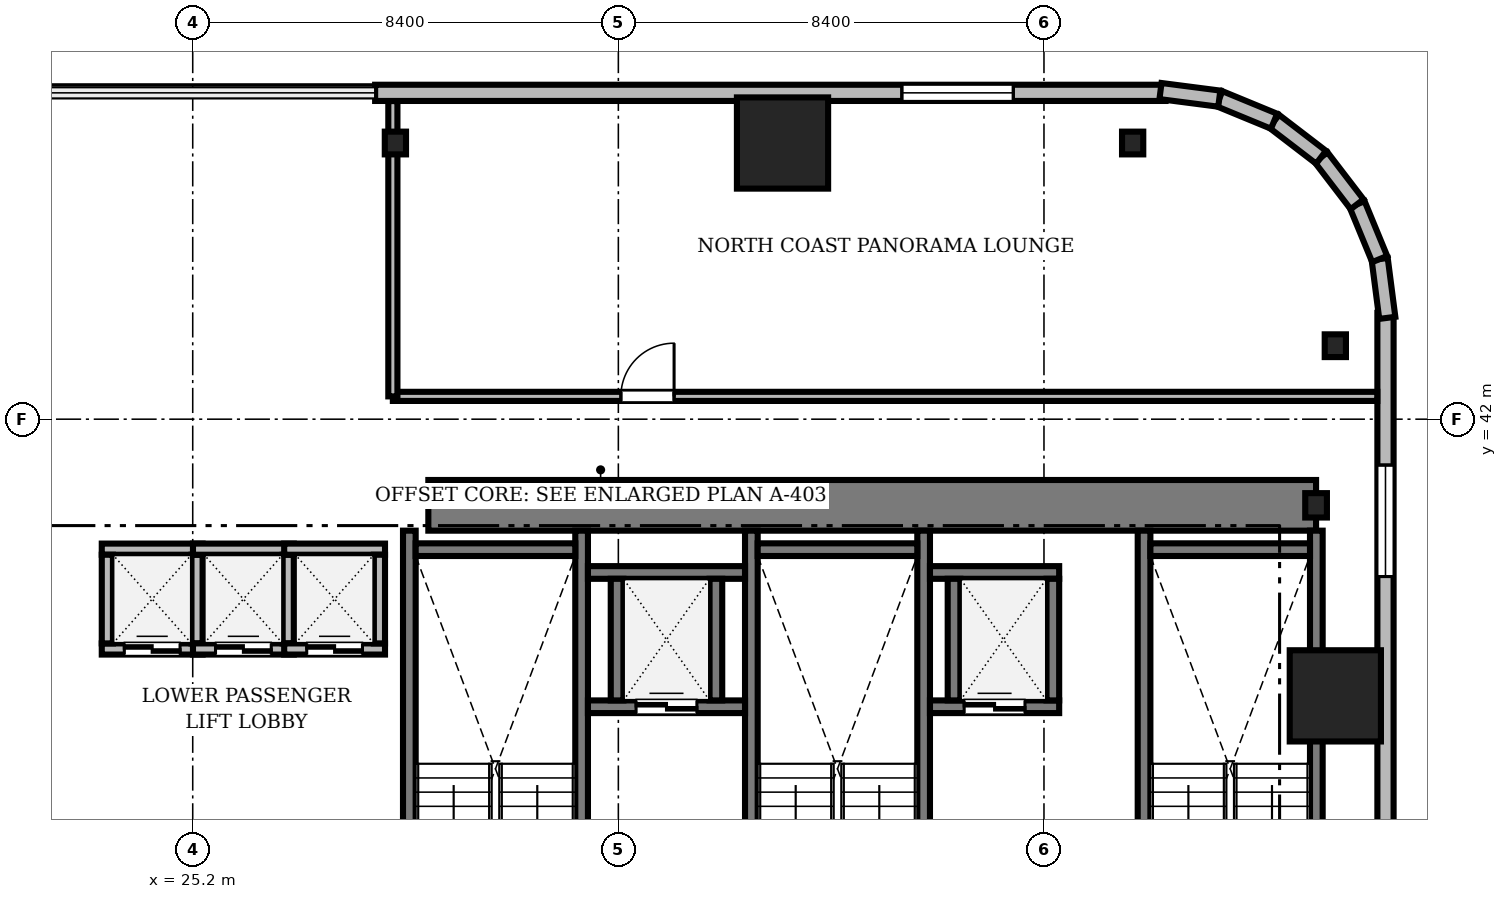
"""IFC4 building model, lengths in metres.
Left out: names, types, materials, properties, quantities, classifications, styles, units other than length and angle.
Written with IfcOpenShell. Run it as: python <this file> out.ifc"""

import sys

from ifc_helpers import new_model, si_unit, direction, frame, frame_2d, origin, origin_2d, place, context, subcontext, project, spatial, rectangle, i_section, extrude, source, transform, mapped, element, fill, save


model = new_model("IFC4")
c1 = context("Model", 3, precision=1e-05, world=origin(), true_north=direction((0.0, 1.0)))
c2 = subcontext(c1, "Body", "Model", "MODEL_VIEW")
j1 = project(units=[si_unit("LENGTHUNIT", "METRE"), si_unit("PLANEANGLEUNIT", "RADIAN")], contexts=[c1])
p1 = place(None, origin())
s1 = spatial("IfcSite", under=j1, at=p1, CompositionType="ELEMENT")
p2 = place(p1, origin())
s2 = spatial("IfcBuilding", under=s1, at=p2, CompositionType="ELEMENT")
p3 = place(p2, frame((0.0, 0.0, 45.85)))
s3 = spatial("IfcBuildingStorey", under=s2, at=p3, CompositionType="ELEMENT", Elevation=45.85)
m1 = source(origin(), c2, "Body", "SweptSolid", [
    extrude(rectangle(XDim=17.52, YDim=1.0, at=frame_2d((8.76, 0.0))), origin(), (0.0, 0.0, 1.0), 3.41),
])
p4 = place(p3, frame((29.85, 40.3, 0.0), z_axis=(0.0, 0.0, 1.0), x_axis=(1.0, 0.0, 0.0)))
e1 = element("IfcWall", 1, at=p4, inside=s3, PredefinedType="SHEAR", context=c2, shape_type="MappedRepresentation", body=[
    mapped(m1, transform((0.0, 0.0, 0.0), scale=1.0)),
])
m2 = source(origin(), c2, "Body", "SweptSolid", [
    extrude(i_section(OverallWidth=0.428, OverallDepth=0.481, WebThickness=0.04, FlangeThickness=0.063, FilletRadius=0.015, at=origin_2d()), origin(), (0.0, 0.0, 1.0), 3.41),
])
p5 = place(p3, frame((47.37, 40.3, 0.0), z_axis=(0.0, 0.0, 1.0), x_axis=(1.0, 0.0, 0.0)))
e2 = element("IfcColumn", 2, at=p5, inside=s3, PredefinedType="COLUMN", context=c2, shape_type="MappedRepresentation", body=[
    mapped(m2, transform((0.0, 0.0, 0.0), scale=1.0)),
])
m3 = source(origin(), c2, "Body", "SweptSolid", [
    extrude(rectangle(XDim=1.8, YDim=1.8, at=origin_2d()), origin(), (0.0, 0.0, 1.0), 3.41),
])
for number, where, z_axis, x_axis in (
    (3, (47.75, 36.54, 0.0), (0.0, 0.0, 1.0), (1.0, 0.0, 0.0)),
    (4, (36.84, 47.45, 0.0), (0.0, 0.0, 1.0), (1.0, 0.0, 0.0)),
):
    element("IfcColumn", number, at=place(p3, frame(where, z_axis=z_axis, x_axis=x_axis)), inside=s3, PredefinedType="COLUMN", context=c2, shape_type="MappedRepresentation", body=[
        mapped(m3, transform((0.0, 0.0, 0.0), scale=1.0)),
    ])
m4 = source(origin(), c2, "Body", "SweptSolid", [
    extrude(i_section(OverallWidth=0.419, OverallDepth=0.449, WebThickness=0.031, FlangeThickness=0.048, FilletRadius=0.015, at=origin_2d()), origin(), (0.0, 0.0, 1.0), 3.41),
])
for number, where, z_axis, x_axis in (
    (5, (47.75, 43.45, 0.0), (0.0, 0.0, 1.0), (1.0, 0.0, 0.0)),
    (6, (43.75, 47.45, 0.0), (0.0, 0.0, 1.0), (1.0, 0.0, 0.0)),
    (7, (29.2, 47.45, 0.0), (0.0, 0.0, 1.0), (1.0, 0.0, 0.0)),
):
    element("IfcColumn", number, at=place(p3, frame(where, z_axis=z_axis, x_axis=x_axis)), inside=s3, PredefinedType="COLUMN", context=c2, shape_type="MappedRepresentation", body=[
        mapped(m4, transform((0.0, 0.0, 0.0), scale=1.0)),
    ])
m5 = source(origin(), c2, "Body", "SweptSolid", [
    extrude(rectangle(XDim=15.6, YDim=0.32, at=frame_2d((7.8, 0.0))), origin(), (0.0, 0.0, 1.0), 3.41),
])
p6 = place(p3, frame((44.4, 48.44, 0.0), z_axis=(0.0, 0.0, 1.0), x_axis=(-1.0, 0.0, 0.0)))
e8 = element("IfcWall", 8, at=p6, inside=s3, PredefinedType="SOLIDWALL", context=c2, shape_type="MappedRepresentation", body=[
    mapped(m5, transform((0.0, 0.0, 0.0), scale=1.0)),
])
m6 = source(origin(), c2, "Body", "SweptSolid", [
    extrude(rectangle(XDim=2.2, YDim=2.4, at=frame_2d((1.1, 1.2))), frame((0.0, 0.17, 0.0), z_axis=(0.0, -1.0, 0.0), x_axis=(1.0, 0.0, 0.0)), (0.0, 0.0, 1.0), 0.34),
])
p7 = place(p6, frame((3.005, 0.0, 0.72)))
e9 = element("IfcOpeningElement", 9, at=p7, cuts=e8, PredefinedType="OPENING", context=c2, shape_type="MappedRepresentation", body=[
    mapped(m6, transform((0.0, 0.0, 0.0), scale=1.0)),
])
m7 = source(origin(), c2, "Body", "SweptSolid", [
    extrude(rectangle(XDim=15.6, YDim=0.32, at=frame_2d((7.8, 0.0))), origin(), (0.0, 0.0, 1.0), 3.41),
])
p8 = place(p3, frame((48.74, 28.5, 0.0), z_axis=(0.0, 0.0, 1.0), x_axis=(0.0, 1.0, 0.0)))
e10 = element("IfcWall", 10, at=p8, inside=s3, PredefinedType="SOLIDWALL", context=c2, shape_type="MappedRepresentation", body=[
    mapped(m7, transform((0.0, 0.0, 0.0), scale=1.0)),
])
p9 = place(p8, frame((10.395, 0.0, 0.72)))
e11 = element("IfcOpeningElement", 11, at=p9, cuts=e10, PredefinedType="OPENING", context=c2, shape_type="MappedRepresentation", body=[
    mapped(m6, transform((0.0, 0.0, 0.0), scale=1.0)),
])
m8 = source(origin(), c2, "Body", "SweptSolid", [
    extrude(rectangle(XDim=1.17, YDim=0.32, at=frame_2d((0.585, 0.0))), origin(), (0.0, 0.0, 1.0), 3.41),
])
p10 = place(p3, frame((48.776, 44.0, 0.0), z_axis=(0.0, 0.0, 1.0), x_axis=(-0.128295670475, 0.991735963317, 0.0)))
e12 = element("IfcWall", 12, at=p10, inside=s3, PredefinedType="SOLIDWALL", context=c2, shape_type="MappedRepresentation", body=[
    mapped(m8, transform((0.0, 0.0, 0.0), scale=1.0)),
])
m9 = source(origin(), c2, "Body", "SweptSolid", [
    extrude(rectangle(XDim=1.169, YDim=0.32, at=frame_2d((0.584, 0.0))), origin(), (0.0, 0.0, 1.0), 3.41),
])
p11 = place(p3, frame((48.625, 45.16, 0.0), z_axis=(0.0, 0.0, 1.0), x_axis=(-0.381054331552, 0.924552646638, 0.0)))
e13 = element("IfcWall", 13, at=p11, inside=s3, PredefinedType="SOLIDWALL", context=c2, shape_type="MappedRepresentation", body=[
    mapped(m9, transform((0.0, 0.0, 0.0), scale=1.0)),
])
m10 = source(origin(), c2, "Body", "SweptSolid", [
    extrude(rectangle(XDim=1.169, YDim=0.32, at=frame_2d((0.584, 0.0))), origin(), (0.0, 0.0, 1.0), 3.41),
])
p12 = place(p3, frame((48.18, 46.241, 0.0), z_axis=(0.0, 0.0, 1.0), x_axis=(-0.608387696831, 0.793639975269, 0.0)))
e14 = element("IfcWall", 14, at=p12, inside=s3, PredefinedType="SOLIDWALL", context=c2, shape_type="MappedRepresentation", body=[
    mapped(m10, transform((0.0, 0.0, 0.0), scale=1.0)),
])
m11 = source(origin(), c2, "Body", "SweptSolid", [
    extrude(rectangle(XDim=1.169, YDim=0.32, at=frame_2d((0.584, 0.0))), origin(), (0.0, 0.0, 1.0), 3.41),
])
p13 = place(p3, frame((47.469, 47.169, 0.0), z_axis=(0.0, 0.0, 1.0), x_axis=(-0.793663520347, 0.608356981114, 0.0)))
e15 = element("IfcWall", 15, at=p13, inside=s3, PredefinedType="SOLIDWALL", context=c2, shape_type="MappedRepresentation", body=[
    mapped(m11, transform((0.0, 0.0, 0.0), scale=1.0)),
])
p14 = place(p3, frame((46.541, 47.88, 0.0), z_axis=(0.0, 0.0, 1.0), x_axis=(-0.924552646638, 0.381054331552, 0.0)))
e16 = element("IfcWall", 16, at=p14, inside=s3, PredefinedType="SOLIDWALL", context=c2, shape_type="MappedRepresentation", body=[
    mapped(m9, transform((0.0, 0.0, 0.0), scale=1.0)),
])
p15 = place(p3, frame((45.46, 48.325, 0.0), z_axis=(0.0, 0.0, 1.0), x_axis=(-0.991735963317, 0.128295670475, 0.0)))
e17 = element("IfcWall", 17, at=p15, inside=s3, PredefinedType="SOLIDWALL", context=c2, shape_type="MappedRepresentation", body=[
    mapped(m8, transform((0.0, 0.0, 0.0), scale=1.0)),
])
m12 = source(origin(), c2, "Body", "SweptSolid", [
    extrude(rectangle(XDim=9.15, YDim=0.25, at=frame_2d((4.575, 0.0))), origin(), (0.0, 0.0, 1.0), 3.45),
])
for number, where, z_axis, x_axis in (
    (18, (29.475, 30.65, 0.0), (0.0, 0.0, 1.0), (0.0, 1.0, 0.0)),
    (19, (32.875, 30.65, 0.0), (0.0, 0.0, 1.0), (0.0, 1.0, 0.0)),
):
    element("IfcWall", number, at=place(p3, frame(where, z_axis=z_axis, x_axis=x_axis)), inside=s3, PredefinedType="SOLIDWALL", context=c2, shape_type="MappedRepresentation", body=[
        mapped(m12, transform((0.0, 0.0, 0.0), scale=1.0)),
    ])
m13 = source(origin(), c2, "Body", "SweptSolid", [
    extrude(rectangle(XDim=3.15, YDim=0.25, at=frame_2d((1.575, 0.0))), origin(), (0.0, 0.0, 1.0), 3.45),
])
p16 = place(p3, frame((29.6, 39.425, 0.0), z_axis=(0.0, 0.0, 1.0), x_axis=(1.0, 0.0, 0.0)))
e20 = element("IfcWall", 20, at=p16, inside=s3, PredefinedType="SOLIDWALL", context=c2, shape_type="MappedRepresentation", body=[
    mapped(m13, transform((0.0, 0.0, 0.0), scale=1.0)),
])
for number, where, z_axis, x_axis in (
    (21, (36.225, 30.65, 0.0), (0.0, 0.0, 1.0), (0.0, 1.0, 0.0)),
    (22, (39.625, 30.65, 0.0), (0.0, 0.0, 1.0), (0.0, 1.0, 0.0)),
):
    element("IfcWall", number, at=place(p3, frame(where, z_axis=z_axis, x_axis=x_axis)), inside=s3, PredefinedType="SOLIDWALL", context=c2, shape_type="MappedRepresentation", body=[
        mapped(m12, transform((0.0, 0.0, 0.0), scale=1.0)),
    ])
p17 = place(p3, frame((36.35, 39.425, 0.0), z_axis=(0.0, 0.0, 1.0), x_axis=(1.0, 0.0, 0.0)))
e23 = element("IfcWall", 23, at=p17, inside=s3, PredefinedType="SOLIDWALL", context=c2, shape_type="MappedRepresentation", body=[
    mapped(m13, transform((0.0, 0.0, 0.0), scale=1.0)),
])
for number, where, z_axis, x_axis in (
    (24, (43.975, 30.65, 0.0), (0.0, 0.0, 1.0), (0.0, 1.0, 0.0)),
    (25, (47.375, 30.65, 0.0), (0.0, 0.0, 1.0), (0.0, 1.0, 0.0)),
):
    element("IfcWall", number, at=place(p3, frame(where, z_axis=z_axis, x_axis=x_axis)), inside=s3, PredefinedType="SOLIDWALL", context=c2, shape_type="MappedRepresentation", body=[
        mapped(m12, transform((0.0, 0.0, 0.0), scale=1.0)),
    ])
p18 = place(p3, frame((44.1, 39.425, 0.0), z_axis=(0.0, 0.0, 1.0), x_axis=(1.0, 0.0, 0.0)))
e26 = element("IfcWall", 26, at=p18, inside=s3, PredefinedType="SOLIDWALL", context=c2, shape_type="MappedRepresentation", body=[
    mapped(m13, transform((0.0, 0.0, 0.0), scale=1.0)),
])
m14 = source(origin(), c2, "Body", "SweptSolid", [
    extrude(rectangle(XDim=1.99, YDim=0.22, at=frame_2d((0.995, 0.0))), origin(), (0.0, 0.0, 1.0), 3.41),
])
p19 = place(p3, frame((23.405, 37.465, 0.0), z_axis=(0.0, 0.0, 1.0), x_axis=(1.0, 0.0, 0.0)))
e27 = element("IfcWall", 27, at=p19, inside=s3, PredefinedType="SOLIDWALL", context=c2, shape_type="MappedRepresentation", body=[
    mapped(m14, transform((0.0, 0.0, 0.0), scale=1.0)),
])
m15 = source(origin(), c2, "Body", "SweptSolid", [
    extrude(rectangle(XDim=1.1, YDim=2.2, at=frame_2d((0.55, 1.1))), frame((0.0, 0.12, 0.0), z_axis=(0.0, -1.0, 0.0), x_axis=(1.0, 0.0, 0.0)), (0.0, 0.0, 1.0), 0.24),
])
p20 = place(p19, frame((0.445, 0.0, 0.0)))
e28 = element("IfcOpeningElement", 28, at=p20, cuts=e27, PredefinedType="OPENING", context=c2, shape_type="MappedRepresentation", body=[
    mapped(m15, transform((0.0, 0.0, 0.0), scale=1.0)),
])
p21 = place(p3, frame((23.405, 39.435, 0.0), z_axis=(0.0, 0.0, 1.0), x_axis=(1.0, 0.0, 0.0)))
e29 = element("IfcWall", 29, at=p21, inside=s3, PredefinedType="SOLIDWALL", context=c2, shape_type="MappedRepresentation", body=[
    mapped(m14, transform((0.0, 0.0, 0.0), scale=1.0)),
])
m16 = source(origin(), c2, "Body", "SweptSolid", [
    extrude(rectangle(XDim=1.75, YDim=0.22, at=frame_2d((0.875, 0.0))), origin(), (0.0, 0.0, 1.0), 3.41),
])
for number, where, z_axis, x_axis in (
    (30, (23.515, 37.575, 0.0), (0.0, 0.0, 1.0), (0.0, 1.0, 0.0)),
    (31, (25.285, 37.575, 0.0), (0.0, 0.0, 1.0), (0.0, 1.0, 0.0)),
):
    element("IfcWall", number, at=place(p3, frame(where, z_axis=z_axis, x_axis=x_axis)), inside=s3, PredefinedType="SOLIDWALL", context=c2, shape_type="MappedRepresentation", body=[
        mapped(m16, transform((0.0, 0.0, 0.0), scale=1.0)),
    ])
p22 = place(p3, frame((25.205, 37.465, 0.0), z_axis=(0.0, 0.0, 1.0), x_axis=(1.0, 0.0, 0.0)))
e32 = element("IfcWall", 32, at=p22, inside=s3, PredefinedType="SOLIDWALL", context=c2, shape_type="MappedRepresentation", body=[
    mapped(m14, transform((0.0, 0.0, 0.0), scale=1.0)),
])
p23 = place(p22, frame((0.445, 0.0, 0.0)))
e33 = element("IfcOpeningElement", 33, at=p23, cuts=e32, PredefinedType="OPENING", context=c2, shape_type="MappedRepresentation", body=[
    mapped(m15, transform((0.0, 0.0, 0.0), scale=1.0)),
])
p24 = place(p3, frame((25.205, 39.435, 0.0), z_axis=(0.0, 0.0, 1.0), x_axis=(1.0, 0.0, 0.0)))
e34 = element("IfcWall", 34, at=p24, inside=s3, PredefinedType="SOLIDWALL", context=c2, shape_type="MappedRepresentation", body=[
    mapped(m14, transform((0.0, 0.0, 0.0), scale=1.0)),
])
p25 = place(p3, frame((27.085, 37.575, 0.0), z_axis=(0.0, 0.0, 1.0), x_axis=(0.0, 1.0, 0.0)))
e35 = element("IfcWall", 35, at=p25, inside=s3, PredefinedType="SOLIDWALL", context=c2, shape_type="MappedRepresentation", body=[
    mapped(m16, transform((0.0, 0.0, 0.0), scale=1.0)),
])
m17 = source(origin(), c2, "Body", "SweptSolid", [
    extrude(rectangle(XDim=1.99, YDim=0.22, at=frame_2d((0.995, 0.0))), origin(), (0.0, 0.0, 1.0), 3.41),
])
p26 = place(p3, frame((27.005, 37.465, 0.0), z_axis=(0.0, 0.0, 1.0), x_axis=(1.0, 0.0, 0.0)))
e36 = element("IfcWall", 36, at=p26, inside=s3, PredefinedType="SOLIDWALL", context=c2, shape_type="MappedRepresentation", body=[
    mapped(m17, transform((0.0, 0.0, 0.0), scale=1.0)),
])
p27 = place(p26, frame((0.445, 0.0, 0.0)))
e37 = element("IfcOpeningElement", 37, at=p27, cuts=e36, PredefinedType="OPENING", context=c2, shape_type="MappedRepresentation", body=[
    mapped(m15, transform((0.0, 0.0, 0.0), scale=1.0)),
])
p28 = place(p3, frame((27.005, 39.435, 0.0), z_axis=(0.0, 0.0, 1.0), x_axis=(1.0, 0.0, 0.0)))
e38 = element("IfcWall", 38, at=p28, inside=s3, PredefinedType="SOLIDWALL", context=c2, shape_type="MappedRepresentation", body=[
    mapped(m17, transform((0.0, 0.0, 0.0), scale=1.0)),
])
p29 = place(p3, frame((28.885, 37.575, 0.0), z_axis=(0.0, 0.0, 1.0), x_axis=(0.0, 1.0, 0.0)))
e39 = element("IfcWall", 39, at=p29, inside=s3, PredefinedType="SOLIDWALL", context=c2, shape_type="MappedRepresentation", body=[
    mapped(m16, transform((0.0, 0.0, 0.0), scale=1.0)),
])
m18 = source(origin(), c2, "Body", "SweptSolid", [
    extrude(rectangle(XDim=3.1, YDim=0.25, at=frame_2d((1.55, 0.0))), origin(), (0.0, 0.0, 1.0), 3.41),
])
p30 = place(p3, frame((33.0, 36.325, 0.0), z_axis=(0.0, 0.0, 1.0), x_axis=(1.0, 0.0, 0.0)))
e40 = element("IfcWall", 40, at=p30, inside=s3, PredefinedType="SOLIDWALL", context=c2, shape_type="MappedRepresentation", body=[
    mapped(m18, transform((0.0, 0.0, 0.0), scale=1.0)),
])
m19 = source(origin(), c2, "Body", "SweptSolid", [
    extrude(rectangle(XDim=1.2, YDim=2.25, at=frame_2d((0.6, 1.125))), frame((0.0, 0.135, 0.0), z_axis=(0.0, -1.0, 0.0), x_axis=(1.0, 0.0, 0.0)), (0.0, 0.0, 1.0), 0.27),
])
p31 = place(p30, frame((0.95, 0.0, 0.0)))
e41 = element("IfcOpeningElement", 41, at=p31, cuts=e40, PredefinedType="OPENING", context=c2, shape_type="MappedRepresentation", body=[
    mapped(m19, transform((0.0, 0.0, 0.0), scale=1.0)),
])
p32 = place(p3, frame((33.0, 38.975, 0.0), z_axis=(0.0, 0.0, 1.0), x_axis=(1.0, 0.0, 0.0)))
e42 = element("IfcWall", 42, at=p32, inside=s3, PredefinedType="SOLIDWALL", context=c2, shape_type="MappedRepresentation", body=[
    mapped(m18, transform((0.0, 0.0, 0.0), scale=1.0)),
])
m20 = source(origin(), c2, "Body", "SweptSolid", [
    extrude(rectangle(XDim=2.4, YDim=0.25, at=frame_2d((1.2, 0.0))), origin(), (0.0, 0.0, 1.0), 3.41),
])
for number, where, z_axis, x_axis in (
    (43, (33.575, 36.45, 0.0), (0.0, 0.0, 1.0), (0.0, 1.0, 0.0)),
    (44, (35.525, 36.45, 0.0), (0.0, 0.0, 1.0), (0.0, 1.0, 0.0)),
):
    element("IfcWall", number, at=place(p3, frame(where, z_axis=z_axis, x_axis=x_axis)), inside=s3, PredefinedType="SOLIDWALL", context=c2, shape_type="MappedRepresentation", body=[
        mapped(m20, transform((0.0, 0.0, 0.0), scale=1.0)),
    ])
m21 = source(origin(), c2, "Body", "SweptSolid", [
    extrude(rectangle(XDim=2.55, YDim=0.25, at=frame_2d((1.275, 0.0))), origin(), (0.0, 0.0, 1.0), 3.41),
])
p33 = place(p3, frame((39.75, 36.325, 0.0), z_axis=(0.0, 0.0, 1.0), x_axis=(1.0, 0.0, 0.0)))
e45 = element("IfcWall", 45, at=p33, inside=s3, PredefinedType="SOLIDWALL", context=c2, shape_type="MappedRepresentation", body=[
    mapped(m21, transform((0.0, 0.0, 0.0), scale=1.0)),
])
p34 = place(p33, frame((0.675, 0.0, 0.0)))
e46 = element("IfcOpeningElement", 46, at=p34, cuts=e45, PredefinedType="OPENING", context=c2, shape_type="MappedRepresentation", body=[
    mapped(m19, transform((0.0, 0.0, 0.0), scale=1.0)),
])
p35 = place(p3, frame((39.75, 38.975, 0.0), z_axis=(0.0, 0.0, 1.0), x_axis=(1.0, 0.0, 0.0)))
e47 = element("IfcWall", 47, at=p35, inside=s3, PredefinedType="SOLIDWALL", context=c2, shape_type="MappedRepresentation", body=[
    mapped(m21, transform((0.0, 0.0, 0.0), scale=1.0)),
])
for number, where, z_axis, x_axis in (
    (48, (40.225, 36.45, 0.0), (0.0, 0.0, 1.0), (0.0, 1.0, 0.0)),
    (49, (42.175, 36.45, 0.0), (0.0, 0.0, 1.0), (0.0, 1.0, 0.0)),
):
    element("IfcWall", number, at=place(p3, frame(where, z_axis=z_axis, x_axis=x_axis)), inside=s3, PredefinedType="SOLIDWALL", context=c2, shape_type="MappedRepresentation", body=[
        mapped(m20, transform((0.0, 0.0, 0.0), scale=1.0)),
    ])
m22 = source(origin(), c2, "Body", "SweptSolid", [
    extrude(rectangle(XDim=19.428, YDim=0.18, at=frame_2d((9.714, 0.0))), origin(), (0.0, 0.0, 1.0), 2.652),
])
p36 = place(p3, frame((29.15, 42.45, 0.0), z_axis=(0.0, 0.0, 1.0), x_axis=(1.0, 0.0, 0.0)))
e50 = element("IfcWall", 50, at=p36, inside=s3, PredefinedType="PARTITIONING", context=c2, shape_type="MappedRepresentation", body=[
    mapped(m22, transform((0.0, 0.0, 0.0), scale=1.0)),
])
m23 = source(origin(), c2, "Body", "SweptSolid", [
    extrude(rectangle(XDim=1.05, YDim=2.2, at=frame_2d((0.525, 1.1))), frame((0.0, 0.1, 0.0), z_axis=(0.0, -1.0, 0.0), x_axis=(1.0, 0.0, 0.0)), (0.0, 0.0, 1.0), 0.2),
])
p37 = place(p36, frame((4.5, 0.0, 0.0)))
e51 = element("IfcOpeningElement", 51, at=p37, cuts=e50, PredefinedType="OPENING", context=c2, shape_type="MappedRepresentation", body=[
    mapped(m23, transform((0.0, 0.0, 0.0), scale=1.0)),
])
m24 = source(origin(), c2, "Body", "SweptSolid", [
    extrude(rectangle(XDim=5.828, YDim=0.18, at=frame_2d((2.914, 0.0))), origin(), (0.0, 0.0, 1.0), 2.652),
])
p38 = place(p3, frame((29.15, 42.45, 0.0), z_axis=(0.0, 0.0, 1.0), x_axis=(0.0, 1.0, 0.0)))
e52 = element("IfcWall", 52, at=p38, inside=s3, PredefinedType="PARTITIONING", context=c2, shape_type="MappedRepresentation", body=[
    mapped(m24, transform((0.0, 0.0, 0.0), scale=1.0)),
])
m25 = source(origin(), c2, "Body", "SweptSolid", [
    extrude(rectangle(XDim=2.2, YDim=2.4, at=frame_2d((1.1, 1.2))), frame((0.0, 0.03, 0.0), z_axis=(0.0, -1.0, 0.0), x_axis=(1.0, 0.0, 0.0)), (0.0, 0.0, 1.0), 0.06),
])
p39 = place(p7, origin())
e53 = element("IfcWindow", 53, at=p39, inside=s3, PartitioningType="SINGLE_PANEL", PredefinedType="WINDOW", context=c2, shape_type="MappedRepresentation", body=[
    mapped(m25, transform((0.0, 0.0, 0.0), scale=1.0)),
])
fill(e9, e53)
p40 = place(p9, origin())
e54 = element("IfcWindow", 54, at=p40, inside=s3, PartitioningType="SINGLE_PANEL", PredefinedType="WINDOW", context=c2, shape_type="MappedRepresentation", body=[
    mapped(m25, transform((0.0, 0.0, 0.0), scale=1.0)),
])
fill(e11, e54)
m26 = source(origin(), c2, "Body", "SweptSolid", [
    extrude(rectangle(XDim=1.1, YDim=2.2, at=frame_2d((0.55, 1.1))), frame((0.0, 0.025, 0.0), z_axis=(0.0, -1.0, 0.0), x_axis=(1.0, 0.0, 0.0)), (0.0, 0.0, 1.0), 0.05),
])
p41 = place(p20, origin())
e55 = element("IfcDoor", 55, at=p41, inside=s3, OperationType="DOUBLE_DOOR_SLIDING", PredefinedType="DOOR", context=c2, shape_type="MappedRepresentation", body=[
    mapped(m26, transform((0.0, 0.0, 0.0), scale=1.0)),
])
fill(e28, e55)
p42 = place(p23, origin())
e56 = element("IfcDoor", 56, at=p42, inside=s3, OperationType="DOUBLE_DOOR_SLIDING", PredefinedType="DOOR", context=c2, shape_type="MappedRepresentation", body=[
    mapped(m26, transform((0.0, 0.0, 0.0), scale=1.0)),
])
fill(e33, e56)
p43 = place(p27, origin())
e57 = element("IfcDoor", 57, at=p43, inside=s3, OperationType="DOUBLE_DOOR_SLIDING", PredefinedType="DOOR", context=c2, shape_type="MappedRepresentation", body=[
    mapped(m26, transform((0.0, 0.0, 0.0), scale=1.0)),
])
fill(e37, e57)
m27 = source(origin(), c2, "Body", "SweptSolid", [
    extrude(rectangle(XDim=1.2, YDim=2.25, at=frame_2d((0.6, 1.125))), frame((0.0, 0.025, 0.0), z_axis=(0.0, -1.0, 0.0), x_axis=(1.0, 0.0, 0.0)), (0.0, 0.0, 1.0), 0.05),
])
p44 = place(p31, origin())
e58 = element("IfcDoor", 58, at=p44, inside=s3, OperationType="DOUBLE_DOOR_SLIDING", PredefinedType="DOOR", context=c2, shape_type="MappedRepresentation", body=[
    mapped(m27, transform((0.0, 0.0, 0.0), scale=1.0)),
])
fill(e41, e58)
p45 = place(p34, origin())
e59 = element("IfcDoor", 59, at=p45, inside=s3, OperationType="DOUBLE_DOOR_SLIDING", PredefinedType="DOOR", context=c2, shape_type="MappedRepresentation", body=[
    mapped(m27, transform((0.0, 0.0, 0.0), scale=1.0)),
])
fill(e46, e59)
m28 = source(origin(), c2, "Body", "SweptSolid", [
    extrude(rectangle(XDim=1.05, YDim=2.2, at=frame_2d((0.525, 1.1))), frame((0.0, 0.025, 0.0), z_axis=(0.0, -1.0, 0.0), x_axis=(1.0, 0.0, 0.0)), (0.0, 0.0, 1.0), 0.05),
])
p46 = place(p37, origin())
e60 = element("IfcDoor", 60, at=p46, inside=s3, OperationType="SINGLE_SWING_RIGHT", PredefinedType="DOOR", context=c2, shape_type="MappedRepresentation", body=[
    mapped(m28, transform((0.0, 0.0, 0.0), scale=1.0)),
])
fill(e51, e60)
save(model, sys.argv[1])
